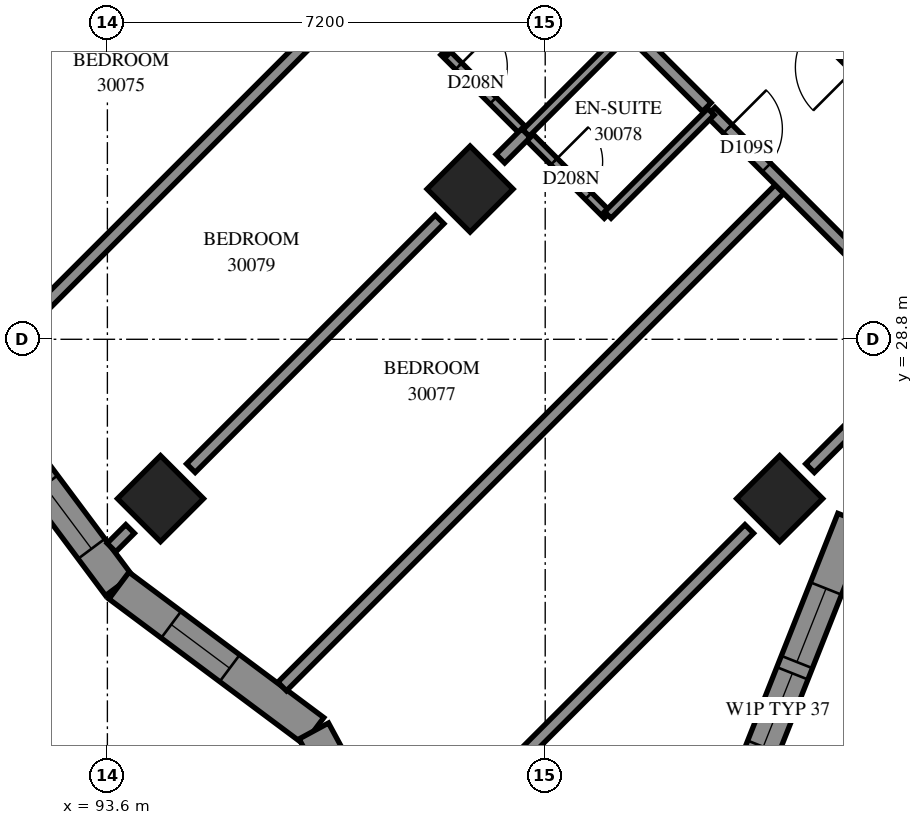
"""IFC4 building model, lengths in metres.
Left out: names, types, materials, properties, quantities, classifications, styles, units other than length and angle.
Written with IfcOpenShell. Run it as: python <this file> out.ifc"""

import sys

from ifc_helpers import new_model, si_unit, direction, frame, frame_2d, origin, origin_2d, place, context, subcontext, project, spatial, polyline, rectangle, outline, extrude, element, fill, save


model = new_model("IFC4")
c1 = context("Model", 3, precision=1e-05, world=origin(), true_north=direction((0.0, 1.0)))
c2 = subcontext(c1, "Body", "Model", "MODEL_VIEW")
j1 = project(units=[si_unit("LENGTHUNIT", "METRE"), si_unit("PLANEANGLEUNIT", "RADIAN")], contexts=[c1])
p1 = place(None, origin())
s1 = spatial("IfcSite", under=j1, at=p1, CompositionType="ELEMENT")
p2 = place(p1, origin())
s2 = spatial("IfcBuilding", under=s1, at=p2, CompositionType="ELEMENT")
p3 = place(p2, frame((0.0, 0.0, 111.8)))
s3 = spatial("IfcBuildingStorey", under=s2, at=p3, CompositionType="ELEMENT", Elevation=111.8)
for number, where, z_axis, x_axis in (
    (1, (99.565, 31.271, 0.0), (0.0, 0.0, 1.0), (0.707, -0.707, 0.0)),
    (2, (94.474, 26.18, 0.0), (0.0, 0.0, 1.0), (0.707, -0.707, 0.0)),
    (3, (104.656, 26.18, 0.0), (0.0, 0.0, 1.0), (0.707, -0.707, 0.0)),
):
    element("IfcColumn", number, at=place(p3, frame(where, z_axis=z_axis, x_axis=x_axis)), inside=s3, PredefinedType="COLUMN", context=c2, shape_type="SweptSolid", body=[
        extrude(rectangle(XDim=1.0, YDim=1.0, at=origin_2d()), origin(), (0.0, 0.0, 1.0), 3.1),
    ])
p4 = place(p3, frame((103.825, 20.684, 0.0), z_axis=(0.0, 0.0, 1.0), x_axis=(0.3687200705, 0.929540483, 0.0)))
e4 = element("IfcWall", 4, at=p4, inside=s3, PredefinedType="SOLIDWALL", context=c2, shape_type="SweptSolid", body=[
    extrude(outline(polyline([(-0.124, -0.275), (5.424, -0.275), (5.661, 0.275), (0.124, 0.275), (-0.124, -0.275)])), origin(), (0.0, 0.0, 1.0), 3.1),
])
p5 = place(p4, frame((1.522, 0.0, 0.5)))
e5 = element("IfcOpeningElement", 5, at=p5, cuts=e4, PredefinedType="OPENING", context=c2, shape_type="SweptSolid", body=[
    extrude(rectangle(XDim=1.3, YDim=2.45, at=frame_2d((0.65, 1.225))), frame((0.0, 0.285, 0.0), z_axis=(0.0, -1.0, 0.0), x_axis=(1.0, 0.0, 0.0)), (0.0, 0.0, 1.0), 0.57),
])
p6 = place(p4, frame((3.022, 0.0, 0.5)))
e6 = element("IfcOpeningElement", 6, at=p6, cuts=e4, PredefinedType="OPENING", context=c2, shape_type="SweptSolid", body=[
    extrude(rectangle(XDim=1.3, YDim=2.45, at=frame_2d((0.65, 1.225))), frame((0.0, 0.285, 0.0), z_axis=(0.0, -1.0, 0.0), x_axis=(1.0, 0.0, 0.0)), (0.0, 0.0, 1.0), 0.57),
])
p7 = place(p3, frame((105.868, 25.835, 0.0), z_axis=(0.0, 0.0, 1.0), x_axis=(0.9295367521, 0.368729476, 0.0)))
e7 = element("IfcWall", 7, at=p7, inside=s3, PredefinedType="SOLIDWALL", context=c2, shape_type="SweptSolid", body=[
    extrude(outline(polyline([(0.119, -0.275), (5.667, -0.275), (5.418, 0.275), (-0.119, 0.275), (0.119, -0.275)])), origin(), (0.0, 0.0, 1.0), 3.1),
])
p8 = place(p7, frame((0.647, 0.0, 0.5)))
e8 = element("IfcOpeningElement", 8, at=p8, cuts=e7, PredefinedType="OPENING", context=c2, shape_type="SweptSolid", body=[
    extrude(rectangle(XDim=1.2, YDim=2.45, at=frame_2d((0.6, 1.225))), frame((0.0, 0.285, 0.0), z_axis=(0.0, -1.0, 0.0), x_axis=(1.0, 0.0, 0.0)), (0.0, 0.0, 1.0), 0.57),
])
p9 = place(p7, frame((3.156, 0.0, 0.5)))
e9 = element("IfcOpeningElement", 9, at=p9, cuts=e7, PredefinedType="OPENING", context=c2, shape_type="SweptSolid", body=[
    extrude(rectangle(XDim=1.2, YDim=2.45, at=frame_2d((0.6, 1.225))), frame((0.0, 0.285, 0.0), z_axis=(0.0, -1.0, 0.0), x_axis=(1.0, 0.0, 0.0)), (0.0, 0.0, 1.0), 0.57),
])
p10 = place(p3, frame((91.412, 27.937, 0.0), z_axis=(0.0, 0.0, 1.0), x_axis=(0.5980672997, -0.8014458841, 0.0)))
e10 = element("IfcWall", 10, at=p10, inside=s3, PredefinedType="SOLIDWALL", context=c2, shape_type="SweptSolid", body=[
    extrude(outline(polyline([(0.04, -0.275), (4.017, -0.275), (3.937, 0.275), (-0.04, 0.275), (0.04, -0.275)])), origin(), (0.0, 0.0, 1.0), 3.1),
])
p11 = place(p10, frame((0.422, 0.0, 0.5)))
e11 = element("IfcOpeningElement", 11, at=p11, cuts=e10, PredefinedType="OPENING", context=c2, shape_type="SweptSolid", body=[
    extrude(rectangle(XDim=1.3, YDim=2.45, at=frame_2d((0.65, 1.225))), frame((0.0, 0.285, 0.0), z_axis=(0.0, -1.0, 0.0), x_axis=(1.0, 0.0, 0.0)), (0.0, 0.0, 1.0), 0.57),
])
p12 = place(p10, frame((1.922, 0.0, 0.5)))
e12 = element("IfcOpeningElement", 12, at=p12, cuts=e10, PredefinedType="OPENING", context=c2, shape_type="SweptSolid", body=[
    extrude(rectangle(XDim=1.3, YDim=2.45, at=frame_2d((0.65, 1.225))), frame((0.0, 0.285, 0.0), z_axis=(0.0, -1.0, 0.0), x_axis=(1.0, 0.0, 0.0)), (0.0, 0.0, 1.0), 0.57),
])
p13 = place(p3, frame((93.79, 24.75, 0.0), z_axis=(0.0, 0.0, 1.0), x_axis=(0.8014443864, -0.5980693066, 0.0)))
e13 = element("IfcWall", 13, at=p13, inside=s3, PredefinedType="SOLIDWALL", context=c2, shape_type="SweptSolid", body=[
    extrude(outline(polyline([(-0.04, -0.275), (3.937, -0.275), (4.059, 0.275), (0.04, 0.275), (-0.04, -0.275)])), origin(), (0.0, 0.0, 1.0), 3.1),
])
p14 = place(p13, frame((1.072, 0.0, 0.5)))
e14 = element("IfcOpeningElement", 14, at=p14, cuts=e13, PredefinedType="OPENING", context=c2, shape_type="SweptSolid", body=[
    extrude(rectangle(XDim=1.2, YDim=2.45, at=frame_2d((0.6, 1.225))), frame((0.0, 0.285, 0.0), z_axis=(0.0, -1.0, 0.0), x_axis=(1.0, 0.0, 0.0)), (0.0, 0.0, 1.0), 0.57),
])
p15 = place(p3, frame((96.995, 22.359, 0.0), z_axis=(0.0, 0.0, 1.0), x_axis=(0.4759282688, -0.8794841005, 0.0)))
e15 = element("IfcWall", 15, at=p15, inside=s3, PredefinedType="SOLIDWALL", context=c2, shape_type="SweptSolid", body=[
    extrude(outline(polyline([(0.061, -0.275), (4.167, -0.275), (3.695, 0.275), (-0.061, 0.275), (0.061, -0.275)])), origin(), (0.0, 0.0, 1.0), 3.1),
])
p16 = place(p15, frame((0.917, 0.0, 0.5)))
e16 = element("IfcOpeningElement", 16, at=p16, cuts=e15, PredefinedType="OPENING", context=c2, shape_type="SweptSolid", body=[
    extrude(rectangle(XDim=1.2, YDim=2.45, at=frame_2d((0.6, 1.225))), frame((0.0, 0.285, 0.0), z_axis=(0.0, -1.0, 0.0), x_axis=(1.0, 0.0, 0.0)), (0.0, 0.0, 1.0), 0.57),
])
p17 = place(p3, frame((96.474, 23.09, 0.0), z_axis=(0.0, 0.0, 1.0), x_axis=(0.7071067812, 0.7071067812, 0.0)))
e17 = element("IfcWall", 17, at=p17, inside=s3, PredefinedType="PARTITIONING", context=c2, shape_type="SweptSolid", body=[
    extrude(rectangle(XDim=11.67, YDim=0.2, at=frame_2d((5.835, 0.0))), origin(), (0.0, 0.0, 1.0), 3.1),
])
p18 = place(p3, frame((86.331, 33.312, 0.0), z_axis=(0.0, 0.0, 1.0), x_axis=(0.707102476, 0.7071110864, 0.0)))
e18 = element("IfcWall", 18, at=p18, inside=s3, PredefinedType="PARTITIONING", context=c2, shape_type="SweptSolid", body=[
    extrude(rectangle(XDim=11.614, YDim=0.2, at=frame_2d((5.807, 0.0))), origin(), (0.0, 0.0, 1.0), 3.1),
])
p19 = place(p3, frame((91.452, 28.25, 0.0), z_axis=(0.0, 0.0, 1.0), x_axis=(0.7071931897, 0.7070203621, 0.0)))
e19 = element("IfcWall", 19, at=p19, inside=s3, PredefinedType="PARTITIONING", context=c2, shape_type="SweptSolid", body=[
    extrude(rectangle(XDim=11.572, YDim=0.2, at=frame_2d((5.786, 0.0))), origin(), (0.0, 0.0, 1.0), 3.1),
])
p20 = place(p3, frame((108.831, 30.355, 0.0), z_axis=(0.0, 0.0, 1.0), x_axis=(-0.7073012053, 0.7069123036, 0.0)))
e20 = element("IfcWall", 20, at=p20, inside=s3, PredefinedType="PARTITIONING", context=c2, shape_type="SweptSolid", body=[
    extrude(rectangle(XDim=7.2, YDim=0.2, at=frame_2d((3.6, 0.0))), origin(), (0.0, 0.0, 1.0), 3.1),
])
p21 = place(p20, frame((4.125, 0.0, 0.0)))
e21 = element("IfcOpeningElement", 21, at=p21, cuts=e20, PredefinedType="OPENING", context=c2, shape_type="SweptSolid", body=[
    extrude(rectangle(XDim=1.0, YDim=2.1, at=frame_2d((0.5, 1.05))), frame((0.0, 0.11, 0.0), z_axis=(0.0, -1.0, 0.0), x_axis=(1.0, 0.0, 0.0)), (0.0, 0.0, 1.0), 0.22),
])
p22 = place(p20, frame((0.705, 0.0, 0.0)))
e22 = element("IfcOpeningElement", 22, at=p22, cuts=e20, PredefinedType="OPENING", context=c2, shape_type="SweptSolid", body=[
    extrude(rectangle(XDim=0.9, YDim=2.1, at=frame_2d((0.45, 1.05))), frame((0.0, 0.11, 0.0), z_axis=(0.0, -1.0, 0.0), x_axis=(1.0, 0.0, 0.0)), (0.0, 0.0, 1.0), 0.22),
])
p23 = place(p3, frame((89.881, 31.771, 0.0), z_axis=(0.0, 0.0, 1.0), x_axis=(0.7071067812, 0.7071067812, 0.0)))
e23 = element("IfcWall", 23, at=p23, inside=s3, PredefinedType="PARTITIONING", context=c2, shape_type="SweptSolid", body=[
    extrude(rectangle(XDim=5.787, YDim=0.2, at=frame_2d((2.893, 0.0))), origin(), (0.0, 0.0, 1.0), 3.1),
])
p24 = place(p3, frame((100.063, 21.589, 0.0), z_axis=(0.0, 0.0, 1.0), x_axis=(0.7071067812, 0.7071067812, 0.0)))
e24 = element("IfcWall", 24, at=p24, inside=s3, PredefinedType="PARTITIONING", context=c2, shape_type="SweptSolid", body=[
    extrude(rectangle(XDim=5.787, YDim=0.2, at=frame_2d((2.893, 0.0))), origin(), (0.0, 0.0, 1.0), 2.6),
])
p25 = place(p3, frame((94.973, 26.681, 0.0), z_axis=(0.0, 0.0, 1.0), x_axis=(0.7071067812, 0.7071067812, 0.0)))
e25 = element("IfcWall", 25, at=p25, inside=s3, PredefinedType="PARTITIONING", context=c2, shape_type="SweptSolid", body=[
    extrude(rectangle(XDim=5.784, YDim=0.2, at=frame_2d((2.892, 0.0))), origin(), (0.0, 0.0, 1.0), 3.1),
])
p26 = place(p3, frame((103.521, 32.541, 0.0), z_axis=(0.0, 0.0, 1.0), x_axis=(0.7071067812, -0.7071067812, 0.0)))
e26 = element("IfcWall", 26, at=p26, inside=s3, PredefinedType="PARTITIONING", context=c2, shape_type="SweptSolid", body=[
    extrude(rectangle(XDim=5.301, YDim=0.2, at=frame_2d((2.65, 0.0))), origin(), (0.0, 0.0, 1.0), 3.1),
])
p27 = place(p26, frame((0.396, 0.0, 0.0)))
e27 = element("IfcOpeningElement", 27, at=p27, cuts=e26, PredefinedType="OPENING", context=c2, shape_type="SweptSolid", body=[
    extrude(rectangle(XDim=0.9, YDim=2.1, at=frame_2d((0.45, 1.05))), frame((0.0, 0.11, 0.0), z_axis=(0.0, -1.0, 0.0), x_axis=(1.0, 0.0, 0.0)), (0.0, 0.0, 1.0), 0.22),
])
p28 = place(p3, frame((99.137, 33.531, 0.0), z_axis=(0.0, 0.0, 1.0), x_axis=(0.7071067812, -0.7071067812, 0.0)))
e28 = element("IfcWall", 28, at=p28, inside=s3, PredefinedType="PARTITIONING", context=c2, shape_type="SweptSolid", body=[
    extrude(rectangle(XDim=3.801, YDim=0.15, at=frame_2d((1.901, 0.0))), origin(), (0.0, 0.0, 1.0), 3.1),
])
p29 = place(p28, frame((2.557, 0.0, 0.0)))
e29 = element("IfcOpeningElement", 29, at=p29, cuts=e28, PredefinedType="OPENING", context=c2, shape_type="SweptSolid", body=[
    extrude(rectangle(XDim=0.8, YDim=2.1, at=frame_2d((0.4, 1.05))), frame((0.0, 0.085, 0.0), z_axis=(0.0, -1.0, 0.0), x_axis=(1.0, 0.0, 0.0)), (0.0, 0.0, 1.0), 0.17),
])
p30 = place(p28, frame((0.339, 0.0, 0.0)))
e30 = element("IfcOpeningElement", 30, at=p30, cuts=e28, PredefinedType="OPENING", context=c2, shape_type="SweptSolid", body=[
    extrude(rectangle(XDim=0.8, YDim=2.1, at=frame_2d((0.4, 1.05))), frame((0.0, 0.085, 0.0), z_axis=(0.0, -1.0, 0.0), x_axis=(1.0, 0.0, 0.0)), (0.0, 0.0, 1.0), 0.17),
])
p31 = place(p3, frame((105.155, 26.681, 0.0), z_axis=(0.0, 0.0, 1.0), x_axis=(0.7071067812, 0.7071067812, 0.0)))
e31 = element("IfcWall", 31, at=p31, inside=s3, PredefinedType="PARTITIONING", context=c2, shape_type="SweptSolid", body=[
    extrude(rectangle(XDim=2.993, YDim=0.2, at=frame_2d((1.496, 0.0))), origin(), (0.0, 0.0, 1.0), 2.6),
])
for number, where, z_axis, x_axis in (
    (32, (99.143, 33.531, 0.0), (0.0, 0.0, 1.0), (0.708, 0.707, 0.0)),
    (33, (101.83, 30.844, 0.0), (0.0, 0.0, 1.0), (0.707, 0.708, 0.0)),
):
    element("IfcWall", number, at=place(p3, frame(where, z_axis=z_axis, x_axis=x_axis)), inside=s3, PredefinedType="PARTITIONING", context=c2, shape_type="SweptSolid", body=[
        extrude(rectangle(XDim=2.4, YDim=0.15, at=frame_2d((1.2, 0.0))), origin(), (0.0, 0.0, 1.0), 3.1),
    ])
p32 = place(p3, frame((100.483, 32.191, 0.0), z_axis=(0.0, 0.0, 1.0), x_axis=(0.7071067812, 0.7071067812, 0.0)))
e34 = element("IfcWall", 34, at=p32, inside=s3, PredefinedType="PARTITIONING", context=c2, shape_type="SweptSolid", body=[
    extrude(rectangle(XDim=2.398, YDim=0.15, at=frame_2d((1.199, 0.0))), origin(), (0.0, 0.0, 1.0), 3.1),
])
p33 = place(p3, frame((102.183, 33.889, 0.0), z_axis=(0.0, 0.0, 1.0), x_axis=(0.7076620277, -0.7065510983, 0.0)))
e35 = element("IfcWall", 35, at=p33, inside=s3, PredefinedType="PARTITIONING", context=c2, shape_type="SweptSolid", body=[
    extrude(rectangle(XDim=1.8, YDim=0.2, at=frame_2d((0.9, 0.0))), origin(), (0.0, 0.0, 1.0), 3.1),
])
p34 = place(p3, frame((100.063, 31.771, 0.0), z_axis=(0.0, 0.0, 1.0), x_axis=(0.7071067812, 0.7071067812, 0.0)))
e36 = element("IfcWall", 36, at=p34, inside=s3, PredefinedType="PARTITIONING", context=c2, shape_type="SweptSolid", body=[
    extrude(rectangle(XDim=0.594, YDim=0.2, at=frame_2d((0.297, 0.0))), origin(), (0.0, 0.0, 1.0), 3.1),
])
p35 = place(p3, frame((93.667, 25.375, 0.0), z_axis=(0.0, 0.0, 1.0), x_axis=(0.7071067812, 0.7071067812, 0.0)))
e37 = element("IfcWall", 37, at=p35, inside=s3, PredefinedType="PARTITIONING", context=c2, shape_type="SweptSolid", body=[
    extrude(rectangle(XDim=0.433, YDim=0.2, at=frame_2d((0.216, 0.0))), origin(), (0.0, 0.0, 1.0), 3.1),
])
p36 = place(p5, origin())
e38 = element("IfcWindow", 38, at=p36, inside=s3, PartitioningType="SINGLE_PANEL", PredefinedType="WINDOW", context=c2, shape_type="SweptSolid", body=[
    extrude(rectangle(XDim=1.3, YDim=2.45, at=frame_2d((0.65, 1.225))), frame((0.0, 0.155, 0.0), z_axis=(0.0, -1.0, 0.0), x_axis=(1.0, 0.0, 0.0)), (0.0, 0.0, 1.0), 0.06),
])
fill(e5, e38)
p37 = place(p6, origin())
e39 = element("IfcWindow", 39, at=p37, inside=s3, PartitioningType="SINGLE_PANEL", PredefinedType="WINDOW", context=c2, shape_type="SweptSolid", body=[
    extrude(rectangle(XDim=1.3, YDim=2.45, at=frame_2d((0.65, 1.225))), frame((0.0, 0.155, 0.0), z_axis=(0.0, -1.0, 0.0), x_axis=(1.0, 0.0, 0.0)), (0.0, 0.0, 1.0), 0.06),
])
fill(e6, e39)
p38 = place(p12, origin())
e40 = element("IfcWindow", 40, at=p38, inside=s3, PartitioningType="SINGLE_PANEL", PredefinedType="WINDOW", context=c2, shape_type="SweptSolid", body=[
    extrude(rectangle(XDim=1.3, YDim=2.45, at=frame_2d((0.65, 1.225))), frame((0.0, 0.155, 0.0), z_axis=(0.0, -1.0, 0.0), x_axis=(1.0, 0.0, 0.0)), (0.0, 0.0, 1.0), 0.06),
])
fill(e12, e40)
p39 = place(p14, origin())
e41 = element("IfcWindow", 41, at=p39, inside=s3, PartitioningType="SINGLE_PANEL", PredefinedType="WINDOW", context=c2, shape_type="SweptSolid", body=[
    extrude(rectangle(XDim=1.2, YDim=2.45, at=frame_2d((0.6, 1.225))), frame((0.0, 0.155, 0.0), z_axis=(0.0, -1.0, 0.0), x_axis=(1.0, 0.0, 0.0)), (0.0, 0.0, 1.0), 0.06),
])
fill(e14, e41)
p40 = place(p21, origin())
e42 = element("IfcDoor", 42, at=p40, inside=s3, OperationType="SINGLE_SWING_LEFT", PredefinedType="DOOR", context=c2, shape_type="SweptSolid", body=[
    extrude(rectangle(XDim=1.0, YDim=2.1, at=frame_2d((0.5, 1.05))), frame((0.0, 0.025, 0.0), z_axis=(0.0, -1.0, 0.0), x_axis=(1.0, 0.0, 0.0)), (0.0, 0.0, 1.0), 0.05),
])
fill(e21, e42)
p41 = place(p27, origin())
e43 = element("IfcDoor", 43, at=p41, inside=s3, OperationType="SINGLE_SWING_RIGHT", PredefinedType="DOOR", context=c2, shape_type="SweptSolid", body=[
    extrude(rectangle(XDim=0.9, YDim=2.1, at=frame_2d((0.45, 1.05))), frame((0.0, 0.025, 0.0), z_axis=(0.0, -1.0, 0.0), x_axis=(1.0, 0.0, 0.0)), (0.0, 0.0, 1.0), 0.05),
])
fill(e27, e43)
p42 = place(p29, origin())
e44 = element("IfcDoor", 44, at=p42, inside=s3, OperationType="SINGLE_SWING_RIGHT", PredefinedType="DOOR", context=c2, shape_type="SweptSolid", body=[
    extrude(rectangle(XDim=0.8, YDim=2.1, at=frame_2d((0.4, 1.05))), frame((0.0, 0.025, 0.0), z_axis=(0.0, -1.0, 0.0), x_axis=(1.0, 0.0, 0.0)), (0.0, 0.0, 1.0), 0.05),
])
fill(e29, e44)
p43 = place(p30, origin())
e45 = element("IfcDoor", 45, at=p43, inside=s3, OperationType="SINGLE_SWING_RIGHT", PredefinedType="DOOR", context=c2, shape_type="SweptSolid", body=[
    extrude(rectangle(XDim=0.8, YDim=2.1, at=frame_2d((0.4, 1.05))), frame((0.0, 0.025, 0.0), z_axis=(0.0, -1.0, 0.0), x_axis=(1.0, 0.0, 0.0)), (0.0, 0.0, 1.0), 0.05),
])
fill(e30, e45)
save(model, sys.argv[1])
